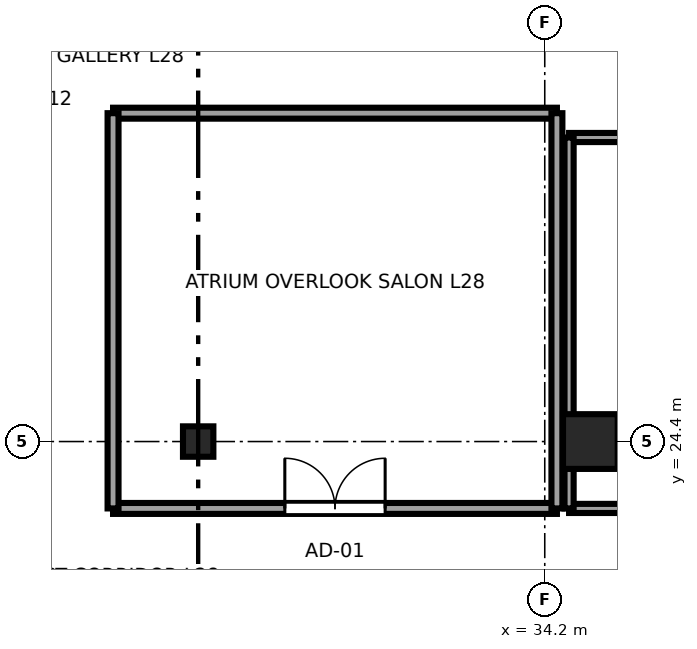
"""IFC4 building model, lengths in metres.
Left out: names, types, materials, properties, quantities, classifications, styles, units other than length and angle.
Written with IfcOpenShell. Run it as: python <this file> out.ifc"""

import sys

from ifc_helpers import new_model, si_unit, direction, frame, frame_2d, origin, origin_2d, place, context, subcontext, project, spatial, rectangle, i_section, extrude, source, transform, mapped, element, fill, save


model = new_model("IFC4")
c1 = context("Model", 3, precision=1e-05, world=origin(), true_north=direction((0.0, 1.0)))
c2 = subcontext(c1, "Body", "Model", "MODEL_VIEW")
j1 = project(units=[si_unit("LENGTHUNIT", "METRE"), si_unit("PLANEANGLEUNIT", "RADIAN")], contexts=[c1])
p1 = place(None, origin())
s1 = spatial("IfcSite", under=j1, at=p1, CompositionType="ELEMENT")
p2 = place(p1, origin())
s2 = spatial("IfcBuilding", under=s1, at=p2, CompositionType="ELEMENT")
p3 = place(p2, frame((0.0, 0.0, 111.55)))
s3 = spatial("IfcBuildingStorey", under=s2, at=p3, CompositionType="ELEMENT", Elevation=111.55)
m1 = source(origin(), c2, "Body", "SweptSolid", [
    extrude(rectangle(XDim=0.9, YDim=0.9, at=origin_2d()), origin(), (0.0, 0.0, 1.0), 3.55),
])
p4 = place(p3, frame((34.95, 24.4, 0.0), z_axis=(0.0, 0.0, 1.0), x_axis=(1.0, 0.0, 0.0)))
e1 = element("IfcColumn", 1, at=p4, inside=s3, PredefinedType="COLUMN", context=c2, shape_type="MappedRepresentation", body=[
    mapped(m1, transform((0.0, 0.0, 0.0), x_axis=(1.0, 0.0, 0.0), y_axis=(0.0, 1.0, 0.0), z_axis=(0.0, 0.0, 1.0), scale=1.0)),
])
m2 = source(origin(), c2, "Body", "SweptSolid", [
    extrude(i_section(OverallWidth=0.5, OverallDepth=0.5, WebThickness=0.022, FlangeThickness=0.034, at=origin_2d()), origin(), (0.0, 0.0, 1.0), 3.55),
])
p5 = place(p3, frame((28.5, 24.4, 0.0), z_axis=(0.0, 0.0, 1.0), x_axis=(1.0, 0.0, 0.0)))
e2 = element("IfcColumn", 2, at=p5, inside=s3, PredefinedType="COLUMN", context=c2, shape_type="MappedRepresentation", body=[
    mapped(m2, transform((0.0, 0.0, 0.0), x_axis=(1.0, 0.0, 0.0), y_axis=(0.0, 1.0, 0.0), z_axis=(0.0, 0.0, 1.0), scale=1.0)),
])
p6 = place(p3, frame((27.1, 23.3, 0.0), z_axis=(0.0, 0.0, 1.0), x_axis=(1.0, 0.0, 0.0)))
e3 = element("IfcWall", 3, at=p6, inside=s3, PredefinedType="PARTITIONING", context=c2, shape_type="SweptSolid", body=[
    extrude(rectangle(XDim=7.3, YDim=0.18, at=frame_2d((3.65, 0.0))), origin(), (0.0, 0.0, 1.0), 3.37),
])
p7 = place(p6, frame((2.825, 0.0, 0.0)))
e4 = element("IfcOpeningElement", 4, at=p7, cuts=e3, PredefinedType="OPENING", context=c2, shape_type="SweptSolid", body=[
    extrude(rectangle(XDim=1.65, YDim=2.15, at=frame_2d((0.825, 1.075))), frame((0.0, 0.1, 0.0), z_axis=(0.0, -1.0, 0.0), x_axis=(1.0, 0.0, 0.0)), (0.0, 0.0, 1.0), 0.2),
])
p8 = place(p3, frame((27.1, 29.8, 0.0), z_axis=(0.0, 0.0, 1.0), x_axis=(1.0, 0.0, 0.0)))
e5 = element("IfcWall", 5, at=p8, inside=s3, PredefinedType="PARTITIONING", context=c2, shape_type="SweptSolid", body=[
    extrude(rectangle(XDim=7.3, YDim=0.18, at=frame_2d((3.65, 0.0))), origin(), (0.0, 0.0, 1.0), 3.37),
])
for number, where, z_axis, x_axis in (
    (6, (27.1, 23.3, 0.0), (0.0, 0.0, 1.0), (0.0, 1.0, 0.0)),
    (7, (34.4, 23.3, 0.0), (0.0, 0.0, 1.0), (0.0, 1.0, 0.0)),
):
    element("IfcWall", number, at=place(p3, frame(where, z_axis=z_axis, x_axis=x_axis)), inside=s3, PredefinedType="PARTITIONING", context=c2, shape_type="SweptSolid", body=[
        extrude(rectangle(XDim=6.5, YDim=0.18, at=frame_2d((3.25, 0.0))), origin(), (0.0, 0.0, 1.0), 3.37),
    ])
p9 = place(p3, frame((34.6, 23.3, 0.0), z_axis=(0.0, 0.0, 1.0), x_axis=(1.0, 0.0, 0.0)))
e8 = element("IfcWall", 8, at=p9, inside=s3, PredefinedType="PARTITIONING", context=c2, shape_type="SweptSolid", body=[
    extrude(rectangle(XDim=7.5, YDim=0.15, at=frame_2d((3.75, 0.0))), origin(), (0.0, 0.0, 1.0), 3.37),
])
p10 = place(p9, frame((2.925, 0.0, 0.0)))
e9 = element("IfcOpeningElement", 9, at=p10, cuts=e8, PredefinedType="OPENING", context=c2, shape_type="SweptSolid", body=[
    extrude(rectangle(XDim=1.65, YDim=2.15, at=frame_2d((0.825, 1.075))), frame((0.0, 0.085, 0.0), z_axis=(0.0, -1.0, 0.0), x_axis=(1.0, 0.0, 0.0)), (0.0, 0.0, 1.0), 0.17),
])
p11 = place(p3, frame((34.6, 29.4, 0.0), z_axis=(0.0, 0.0, 1.0), x_axis=(1.0, 0.0, 0.0)))
e10 = element("IfcWall", 10, at=p11, inside=s3, PredefinedType="PARTITIONING", context=c2, shape_type="SweptSolid", body=[
    extrude(rectangle(XDim=7.5, YDim=0.15, at=frame_2d((3.75, 0.0))), origin(), (0.0, 0.0, 1.0), 3.37),
])
p12 = place(p3, frame((34.6, 23.3, 0.0), z_axis=(0.0, 0.0, 1.0), x_axis=(0.0, 1.0, 0.0)))
e11 = element("IfcWall", 11, at=p12, inside=s3, PredefinedType="PARTITIONING", context=c2, shape_type="SweptSolid", body=[
    extrude(rectangle(XDim=6.1, YDim=0.15, at=frame_2d((3.05, 0.0))), origin(), (0.0, 0.0, 1.0), 3.37),
])
m3 = source(origin(), c2, "Body", "SweptSolid", [
    extrude(rectangle(XDim=1.65, YDim=2.15, at=frame_2d((0.825, 1.075))), frame((0.0, 0.025, 0.0), z_axis=(0.0, -1.0, 0.0), x_axis=(1.0, 0.0, 0.0)), (0.0, 0.0, 1.0), 0.05),
])
p13 = place(p7, origin())
e12 = element("IfcDoor", 12, at=p13, inside=s3, OperationType="DOUBLE_DOOR_SINGLE_SWING", PredefinedType="DOOR", context=c2, shape_type="MappedRepresentation", body=[
    mapped(m3, transform((0.0, 0.0, 0.0), x_axis=(1.0, 0.0, 0.0), y_axis=(0.0, 1.0, 0.0), z_axis=(0.0, 0.0, 1.0), scale=1.0)),
])
fill(e4, e12)
save(model, sys.argv[1])
